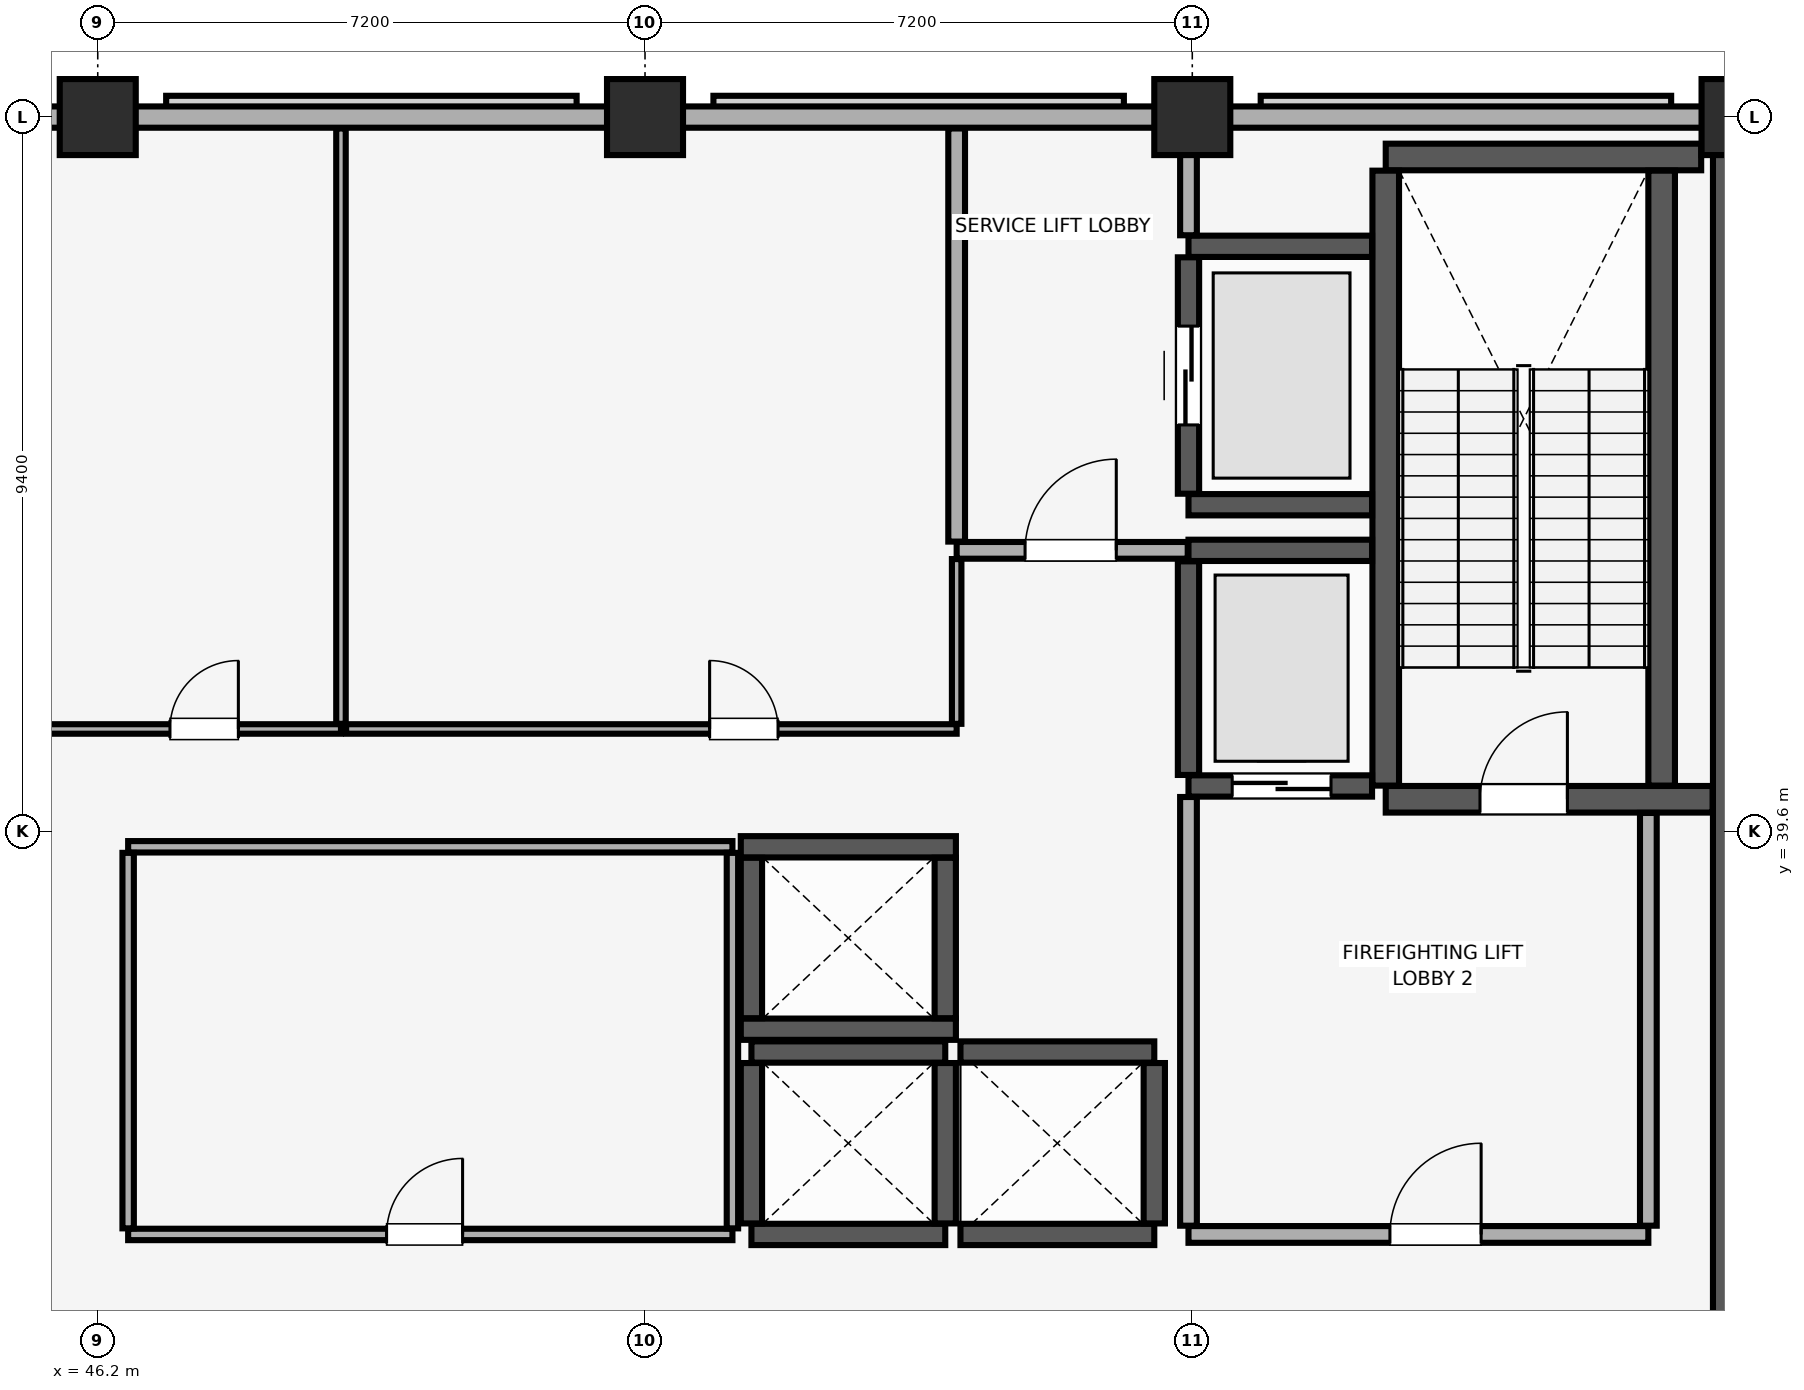
"""IFC4 building model, lengths in metres.
Left out: names, types, materials, properties, quantities, classifications, styles, units other than length and angle.
Written with IfcOpenShell. Run it as: python <this file> out.ifc"""

import sys

from ifc_helpers import new_model, si_unit, direction, frame, frame_2d, origin, origin_2d, place, context, subcontext, project, spatial, rectangle, extrude, element, fill, save


model = new_model("IFC4")
c1 = context("Model", 3, precision=1e-05, world=origin(), true_north=direction((0.0, 1.0)))
c2 = subcontext(c1, "Body", "Model", "MODEL_VIEW")
j1 = project(units=[si_unit("LENGTHUNIT", "METRE"), si_unit("PLANEANGLEUNIT", "RADIAN")], contexts=[c1])
p1 = place(None, origin())
s1 = spatial("IfcSite", under=j1, at=p1, CompositionType="ELEMENT")
p2 = place(p1, origin())
s2 = spatial("IfcBuilding", under=s1, at=p2, CompositionType="ELEMENT")
p3 = place(p2, frame((0.0, 0.0, 280.5)))
s3 = spatial("IfcBuildingStorey", under=s2, at=p3, CompositionType="ELEMENT", Elevation=280.5)
for number, where, z_axis, x_axis in (
    (1, (46.2, 49.0, 0.0), (0.0, 0.0, 1.0), (1.0, 0.0, 0.0)),
    (2, (53.4, 49.0, 0.0), (0.0, 0.0, 1.0), (1.0, 0.0, 0.0)),
    (3, (60.6, 49.0, 0.0), (0.0, 0.0, 1.0), (1.0, 0.0, 0.0)),
    (4, (67.8, 49.0, 0.0), (0.0, 0.0, 1.0), (1.0, 0.0, 0.0)),
):
    element("IfcColumn", number, at=place(p3, frame(where, z_axis=z_axis, x_axis=x_axis)), inside=s3, PredefinedType="COLUMN", context=c2, shape_type="SweptSolid", body=[
        extrude(rectangle(XDim=1.0, YDim=1.0, at=origin_2d()), origin(), (0.0, 0.0, 1.0), 5.1),
    ])
p4 = place(p3, frame((74.2, 49.0, 0.0), z_axis=(0.0, 0.0, 1.0), x_axis=(-1.0, 0.0, 0.0)))
e5 = element("IfcWall", 5, at=p4, inside=s3, PredefinedType="SOLIDWALL", context=c2, shape_type="SweptSolid", body=[
    extrude(rectangle(XDim=64.4, YDim=0.28, at=frame_2d((32.2, 0.0))), origin(), (0.0, 0.0, 1.0), 4.0),
])
p5 = place(p3, frame((67.8, 29.4, 0.0), z_axis=(0.0, 0.0, 1.0), x_axis=(0.0, 1.0, 0.0)))
e6 = element("IfcWall", 6, at=p5, inside=s3, PredefinedType="SHEAR", context=c2, shape_type="SweptSolid", body=[
    extrude(rectangle(XDim=19.2, YDim=0.7, at=frame_2d((9.6, 0.0))), origin(), (0.0, 0.0, 1.0), 5.1),
])
p6 = place(p3, frame((63.145, 40.025, 0.0), z_axis=(0.0, 0.0, 1.0), x_axis=(1.0, 0.0, 0.0)))
e7 = element("IfcWall", 7, at=p6, inside=s3, PredefinedType="SHEAR", context=c2, shape_type="SweptSolid", body=[
    extrude(rectangle(XDim=4.3, YDim=0.35, at=frame_2d((2.15, 0.0))), origin(), (0.0, 0.0, 1.0), 5.1),
])
p7 = place(p6, frame((1.24, 0.0, 0.0)))
e8 = element("IfcOpeningElement", 8, at=p7, cuts=e7, PredefinedType="OPENING", context=c2, shape_type="SweptSolid", body=[
    extrude(rectangle(XDim=1.15, YDim=2.15, at=frame_2d((0.575, 1.075))), frame((0.0, 0.185, 0.0), z_axis=(0.0, -1.0, 0.0), x_axis=(1.0, 0.0, 0.0)), (0.0, 0.0, 1.0), 0.37),
])
p8 = place(p3, frame((63.145, 48.475, 0.0), z_axis=(0.0, 0.0, 1.0), x_axis=(1.0, 0.0, 0.0)))
e9 = element("IfcWall", 9, at=p8, inside=s3, PredefinedType="SHEAR", context=c2, shape_type="SweptSolid", body=[
    extrude(rectangle(XDim=4.15, YDim=0.35, at=frame_2d((2.075, 0.0))), origin(), (0.0, 0.0, 1.0), 5.1),
])
for number, where, z_axis, x_axis in (
    (10, (63.145, 40.205, 0.0), (0.0, 0.0, 1.0), (0.0, 1.0, 0.0)),
    (11, (66.775, 40.205, 0.0), (0.0, 0.0, 1.0), (0.0, 1.0, 0.0)),
):
    element("IfcWall", number, at=place(p3, frame(where, z_axis=z_axis, x_axis=x_axis)), inside=s3, PredefinedType="SHEAR", context=c2, shape_type="SweptSolid", body=[
        extrude(rectangle(XDim=8.09, YDim=0.35, at=frame_2d((4.045, 0.0))), origin(), (0.0, 0.0, 1.0), 5.1),
    ])
for number, where, z_axis, x_axis in (
    (12, (54.8, 34.3, 0.0), (0.0, 0.0, 1.0), (1.0, 0.0, 0.0)),
    (13, (54.8, 36.7, 0.0), (0.0, 0.0, 1.0), (1.0, 0.0, 0.0)),
):
    element("IfcWall", number, at=place(p3, frame(where, z_axis=z_axis, x_axis=x_axis)), inside=s3, PredefinedType="SHEAR", context=c2, shape_type="SweptSolid", body=[
        extrude(rectangle(XDim=2.55, YDim=0.28, at=frame_2d((1.275, 0.0))), origin(), (0.0, 0.0, 1.0), 5.1),
    ])
for number, where, z_axis, x_axis in (
    (14, (54.8, 34.445, 0.0), (0.0, 0.0, 1.0), (0.0, 1.0, 0.0)),
    (15, (57.35, 34.445, 0.0), (0.0, 0.0, 1.0), (0.0, 1.0, 0.0)),
):
    element("IfcWall", number, at=place(p3, frame(where, z_axis=z_axis, x_axis=x_axis)), inside=s3, PredefinedType="SHEAR", context=c2, shape_type="SweptSolid", body=[
        extrude(rectangle(XDim=2.11, YDim=0.28, at=frame_2d((1.055, 0.0))), origin(), (0.0, 0.0, 1.0), 5.1),
    ])
for number, where, z_axis, x_axis in (
    (16, (57.55, 34.3, 0.0), (0.0, 0.0, 1.0), (1.0, 0.0, 0.0)),
    (17, (57.55, 36.7, 0.0), (0.0, 0.0, 1.0), (1.0, 0.0, 0.0)),
):
    element("IfcWall", number, at=place(p3, frame(where, z_axis=z_axis, x_axis=x_axis)), inside=s3, PredefinedType="SHEAR", context=c2, shape_type="SweptSolid", body=[
        extrude(rectangle(XDim=2.55, YDim=0.28, at=frame_2d((1.275, 0.0))), origin(), (0.0, 0.0, 1.0), 5.1),
    ])
p9 = place(p3, frame((60.1, 34.445, 0.0), z_axis=(0.0, 0.0, 1.0), x_axis=(0.0, 1.0, 0.0)))
e18 = element("IfcWall", 18, at=p9, inside=s3, PredefinedType="SHEAR", context=c2, shape_type="SweptSolid", body=[
    extrude(rectangle(XDim=2.11, YDim=0.28, at=frame_2d((1.055, 0.0))), origin(), (0.0, 0.0, 1.0), 5.1),
])
for number, where, z_axis, x_axis in (
    (19, (54.66, 37.0, 0.0), (0.0, 0.0, 1.0), (1.0, 0.0, 0.0)),
    (20, (54.66, 39.4, 0.0), (0.0, 0.0, 1.0), (1.0, 0.0, 0.0)),
):
    element("IfcWall", number, at=place(p3, frame(where, z_axis=z_axis, x_axis=x_axis)), inside=s3, PredefinedType="SHEAR", context=c2, shape_type="SweptSolid", body=[
        extrude(rectangle(XDim=2.83, YDim=0.28, at=frame_2d((1.415, 0.0))), origin(), (0.0, 0.0, 1.0), 5.1),
    ])
for number, where, z_axis, x_axis in (
    (21, (54.8, 37.145, 0.0), (0.0, 0.0, 1.0), (0.0, 1.0, 0.0)),
    (22, (57.35, 37.145, 0.0), (0.0, 0.0, 1.0), (0.0, 1.0, 0.0)),
):
    element("IfcWall", number, at=place(p3, frame(where, z_axis=z_axis, x_axis=x_axis)), inside=s3, PredefinedType="SHEAR", context=c2, shape_type="SweptSolid", body=[
        extrude(rectangle(XDim=2.11, YDim=0.28, at=frame_2d((1.055, 0.0))), origin(), (0.0, 0.0, 1.0), 5.1),
    ])
p10 = place(p3, frame((60.55, 40.2, 0.0), z_axis=(0.0, 0.0, 1.0), x_axis=(1.0, 0.0, 0.0)))
e23 = element("IfcWall", 23, at=p10, inside=s3, PredefinedType="SHEAR", context=c2, shape_type="SweptSolid", body=[
    extrude(rectangle(XDim=2.415, YDim=0.28, at=frame_2d((1.208, 0.0))), origin(), (0.0, 0.0, 1.0), 5.1),
])
p11 = place(p10, frame((0.575, 0.0, 0.0)))
e24 = element("IfcOpeningElement", 24, at=p11, cuts=e23, PredefinedType="OPENING", context=c2, shape_type="SweptSolid", body=[
    extrude(rectangle(XDim=1.3, YDim=2.3, at=frame_2d((0.65, 1.15))), frame((0.0, 0.15, 0.0), z_axis=(0.0, -1.0, 0.0), x_axis=(1.0, 0.0, 0.0)), (0.0, 0.0, 1.0), 0.3),
])
p12 = place(p3, frame((60.55, 43.3, 0.0), z_axis=(0.0, 0.0, 1.0), x_axis=(1.0, 0.0, 0.0)))
e25 = element("IfcWall", 25, at=p12, inside=s3, PredefinedType="SHEAR", context=c2, shape_type="SweptSolid", body=[
    extrude(rectangle(XDim=2.415, YDim=0.28, at=frame_2d((1.208, 0.0))), origin(), (0.0, 0.0, 1.0), 5.1),
])
p13 = place(p3, frame((60.55, 40.345, 0.0), z_axis=(0.0, 0.0, 1.0), x_axis=(0.0, 1.0, 0.0)))
e26 = element("IfcWall", 26, at=p13, inside=s3, PredefinedType="SHEAR", context=c2, shape_type="SweptSolid", body=[
    extrude(rectangle(XDim=2.81, YDim=0.28, at=frame_2d((1.405, 0.0))), origin(), (0.0, 0.0, 1.0), 5.1),
])
for number, where, z_axis, x_axis in (
    (27, (60.55, 43.9, 0.0), (0.0, 0.0, 1.0), (1.0, 0.0, 0.0)),
    (28, (60.55, 47.3, 0.0), (0.0, 0.0, 1.0), (1.0, 0.0, 0.0)),
):
    element("IfcWall", number, at=place(p3, frame(where, z_axis=z_axis, x_axis=x_axis)), inside=s3, PredefinedType="SHEAR", context=c2, shape_type="SweptSolid", body=[
        extrude(rectangle(XDim=2.415, YDim=0.28, at=frame_2d((1.208, 0.0))), origin(), (0.0, 0.0, 1.0), 5.1),
    ])
p14 = place(p3, frame((60.55, 44.045, 0.0), z_axis=(0.0, 0.0, 1.0), x_axis=(0.0, 1.0, 0.0)))
e29 = element("IfcWall", 29, at=p14, inside=s3, PredefinedType="SHEAR", context=c2, shape_type="SweptSolid", body=[
    extrude(rectangle(XDim=3.11, YDim=0.28, at=frame_2d((1.555, 0.0))), origin(), (0.0, 0.0, 1.0), 5.1),
])
p15 = place(p14, frame((0.905, 0.0, 0.0)))
e30 = element("IfcOpeningElement", 30, at=p15, cuts=e29, PredefinedType="OPENING", context=c2, shape_type="SweptSolid", body=[
    extrude(rectangle(XDim=1.3, YDim=2.3, at=frame_2d((0.65, 1.15))), frame((0.0, 0.15, 0.0), z_axis=(0.0, -1.0, 0.0), x_axis=(1.0, 0.0, 0.0)), (0.0, 0.0, 1.0), 0.3),
])
p16 = place(p3, frame((60.55, 34.3, 0.0), z_axis=(0.0, 0.0, 1.0), x_axis=(1.0, 0.0, 0.0)))
e31 = element("IfcWall", 31, at=p16, inside=s3, PredefinedType="PARTITIONING", context=c2, shape_type="SweptSolid", body=[
    extrude(rectangle(XDim=6.05, YDim=0.22, at=frame_2d((3.025, 0.0))), origin(), (0.0, 0.0, 1.0), 5.1),
])
p17 = place(p16, frame((2.65, 0.0, 0.0)))
e32 = element("IfcOpeningElement", 32, at=p17, cuts=e31, PredefinedType="OPENING", context=c2, shape_type="SweptSolid", body=[
    extrude(rectangle(XDim=1.2, YDim=2.15, at=frame_2d((0.6, 1.075))), frame((0.0, 0.12, 0.0), z_axis=(0.0, -1.0, 0.0), x_axis=(1.0, 0.0, 0.0)), (0.0, 0.0, 1.0), 0.24),
])
p18 = place(p3, frame((60.55, 34.415, 0.0), z_axis=(0.0, 0.0, 1.0), x_axis=(0.0, 1.0, 0.0)))
e33 = element("IfcWall", 33, at=p18, inside=s3, PredefinedType="PARTITIONING", context=c2, shape_type="SweptSolid", body=[
    extrude(rectangle(XDim=5.64, YDim=0.22, at=frame_2d((2.82, 0.0))), origin(), (0.0, 0.0, 1.0), 5.1),
])
p19 = place(p3, frame((66.6, 34.415, 0.0), z_axis=(0.0, 0.0, 1.0), x_axis=(0.0, 1.0, 0.0)))
e34 = element("IfcWall", 34, at=p19, inside=s3, PredefinedType="PARTITIONING", context=c2, shape_type="SweptSolid", body=[
    extrude(rectangle(XDim=5.43, YDim=0.22, at=frame_2d((2.715, 0.0))), origin(), (0.0, 0.0, 1.0), 5.1),
])
p20 = place(p3, frame((57.5, 43.3, 0.0), z_axis=(0.0, 0.0, 1.0), x_axis=(1.0, 0.0, 0.0)))
e35 = element("IfcWall", 35, at=p20, inside=s3, PredefinedType="PARTITIONING", context=c2, shape_type="SweptSolid", body=[
    extrude(rectangle(XDim=3.04, YDim=0.22, at=frame_2d((1.52, 0.0))), origin(), (0.0, 0.0, 1.0), 5.1),
])
p21 = place(p20, frame((0.9, 0.0, 0.0)))
e36 = element("IfcOpeningElement", 36, at=p21, cuts=e35, PredefinedType="OPENING", context=c2, shape_type="SweptSolid", body=[
    extrude(rectangle(XDim=1.2, YDim=2.15, at=frame_2d((0.6, 1.075))), frame((0.0, 0.12, 0.0), z_axis=(0.0, -1.0, 0.0), x_axis=(1.0, 0.0, 0.0)), (0.0, 0.0, 1.0), 0.24),
])
p22 = place(p3, frame((57.5, 43.415, 0.0), z_axis=(0.0, 0.0, 1.0), x_axis=(0.0, 1.0, 0.0)))
e37 = element("IfcWall", 37, at=p22, inside=s3, PredefinedType="PARTITIONING", context=c2, shape_type="SweptSolid", body=[
    extrude(rectangle(XDim=5.435, YDim=0.22, at=frame_2d((2.718, 0.0))), origin(), (0.0, 0.0, 1.0), 5.1),
])
p23 = place(p3, frame((60.55, 47.445, 0.0), z_axis=(0.0, 0.0, 1.0), x_axis=(0.0, 1.0, 0.0)))
e38 = element("IfcWall", 38, at=p23, inside=s3, PredefinedType="PARTITIONING", context=c2, shape_type="SweptSolid", body=[
    extrude(rectangle(XDim=1.405, YDim=0.22, at=frame_2d((0.703, 0.0))), origin(), (0.0, 0.0, 1.0), 5.1),
])
p24 = place(p3, frame((46.6, 34.3, 0.0), z_axis=(0.0, 0.0, 1.0), x_axis=(1.0, 0.0, 0.0)))
e39 = element("IfcWall", 39, at=p24, inside=s3, PredefinedType="PARTITIONING", context=c2, shape_type="SweptSolid", body=[
    extrude(rectangle(XDim=7.95, YDim=0.15, at=frame_2d((3.975, 0.0))), origin(), (0.0, 0.0, 1.0), 5.1),
])
p25 = place(p24, frame((3.4, 0.0, 0.0)))
e40 = element("IfcOpeningElement", 40, at=p25, cuts=e39, PredefinedType="OPENING", context=c2, shape_type="SweptSolid", body=[
    extrude(rectangle(XDim=1.0, YDim=2.15, at=frame_2d((0.5, 1.075))), frame((0.0, 0.085, 0.0), z_axis=(0.0, -1.0, 0.0), x_axis=(1.0, 0.0, 0.0)), (0.0, 0.0, 1.0), 0.17),
])
p26 = place(p3, frame((46.6, 39.4, 0.0), z_axis=(0.0, 0.0, 1.0), x_axis=(1.0, 0.0, 0.0)))
e41 = element("IfcWall", 41, at=p26, inside=s3, PredefinedType="PARTITIONING", context=c2, shape_type="SweptSolid", body=[
    extrude(rectangle(XDim=7.95, YDim=0.15, at=frame_2d((3.975, 0.0))), origin(), (0.0, 0.0, 1.0), 5.1),
])
for number, where, z_axis, x_axis in (
    (42, (46.6, 34.38, 0.0), (0.0, 0.0, 1.0), (0.0, 1.0, 0.0)),
    (43, (54.55, 34.38, 0.0), (0.0, 0.0, 1.0), (0.0, 1.0, 0.0)),
):
    element("IfcWall", number, at=place(p3, frame(where, z_axis=z_axis, x_axis=x_axis)), inside=s3, PredefinedType="PARTITIONING", context=c2, shape_type="SweptSolid", body=[
        extrude(rectangle(XDim=4.94, YDim=0.15, at=frame_2d((2.47, 0.0))), origin(), (0.0, 0.0, 1.0), 5.1),
    ])
p27 = place(p3, frame((44.3, 40.95, 0.0), z_axis=(0.0, 0.0, 1.0), x_axis=(1.0, 0.0, 0.0)))
e44 = element("IfcWall", 44, at=p27, inside=s3, PredefinedType="PARTITIONING", context=c2, shape_type="SweptSolid", body=[
    extrude(rectangle(XDim=5.1, YDim=0.125, at=frame_2d((2.55, 0.0))), origin(), (0.0, 0.0, 1.0), 5.1),
])
p28 = place(p27, frame((2.85, 0.0, 0.0)))
e45 = element("IfcOpeningElement", 45, at=p28, cuts=e44, PredefinedType="OPENING", context=c2, shape_type="SweptSolid", body=[
    extrude(rectangle(XDim=0.9, YDim=2.1, at=frame_2d((0.45, 1.05))), frame((0.0, 0.073, 0.0), z_axis=(0.0, -1.0, 0.0), x_axis=(1.0, 0.0, 0.0)), (0.0, 0.0, 1.0), 0.145),
])
p29 = place(p3, frame((49.4, 41.018, 0.0), z_axis=(0.0, 0.0, 1.0), x_axis=(0.0, 1.0, 0.0)))
e46 = element("IfcWall", 46, at=p29, inside=s3, PredefinedType="PARTITIONING", context=c2, shape_type="SweptSolid", body=[
    extrude(rectangle(XDim=7.833, YDim=0.125, at=frame_2d((3.916, 0.0))), origin(), (0.0, 0.0, 1.0), 5.1),
])
p30 = place(p3, frame((49.468, 40.95, 0.0), z_axis=(0.0, 0.0, 1.0), x_axis=(1.0, 0.0, 0.0)))
e47 = element("IfcWall", 47, at=p30, inside=s3, PredefinedType="PARTITIONING", context=c2, shape_type="SweptSolid", body=[
    extrude(rectangle(XDim=8.032, YDim=0.125, at=frame_2d((4.016, 0.0))), origin(), (0.0, 0.0, 1.0), 5.1),
])
p31 = place(p30, frame((4.782, 0.0, 0.0)))
e48 = element("IfcOpeningElement", 48, at=p31, cuts=e47, PredefinedType="OPENING", context=c2, shape_type="SweptSolid", body=[
    extrude(rectangle(XDim=0.9, YDim=2.1, at=frame_2d((0.45, 1.05))), frame((0.0, 0.073, 0.0), z_axis=(0.0, -1.0, 0.0), x_axis=(1.0, 0.0, 0.0)), (0.0, 0.0, 1.0), 0.145),
])
p32 = place(p3, frame((57.5, 41.018, 0.0), z_axis=(0.0, 0.0, 1.0), x_axis=(0.0, 1.0, 0.0)))
e49 = element("IfcWall", 49, at=p32, inside=s3, PredefinedType="PARTITIONING", context=c2, shape_type="SweptSolid", body=[
    extrude(rectangle(XDim=2.167, YDim=0.125, at=frame_2d((1.084, 0.0))), origin(), (0.0, 0.0, 1.0), 5.1),
])
p33 = place(p7, origin())
e50 = element("IfcDoor", 50, at=p33, inside=s3, OperationType="SINGLE_SWING_RIGHT", PredefinedType="DOOR", context=c2, shape_type="SweptSolid", body=[
    extrude(rectangle(XDim=1.15, YDim=2.15, at=frame_2d((0.575, 1.075))), frame((0.0, 0.025, 0.0), z_axis=(0.0, -1.0, 0.0), x_axis=(1.0, 0.0, 0.0)), (0.0, 0.0, 1.0), 0.05),
])
fill(e8, e50)
p34 = place(p11, origin())
e51 = element("IfcDoor", 51, at=p34, inside=s3, OperationType="DOUBLE_DOOR_SLIDING", PredefinedType="DOOR", context=c2, shape_type="SweptSolid", body=[
    extrude(rectangle(XDim=1.3, YDim=2.3, at=frame_2d((0.65, 1.15))), frame((0.0, 0.025, 0.0), z_axis=(0.0, -1.0, 0.0), x_axis=(1.0, 0.0, 0.0)), (0.0, 0.0, 1.0), 0.05),
])
fill(e24, e51)
p35 = place(p15, origin())
e52 = element("IfcDoor", 52, at=p35, inside=s3, OperationType="DOUBLE_DOOR_SLIDING", PredefinedType="DOOR", context=c2, shape_type="SweptSolid", body=[
    extrude(rectangle(XDim=1.3, YDim=2.3, at=frame_2d((0.65, 1.15))), frame((0.0, 0.025, 0.0), z_axis=(0.0, -1.0, 0.0), x_axis=(1.0, 0.0, 0.0)), (0.0, 0.0, 1.0), 0.05),
])
fill(e30, e52)
p36 = place(p17, origin())
e53 = element("IfcDoor", 53, at=p36, inside=s3, OperationType="SINGLE_SWING_RIGHT", PredefinedType="DOOR", context=c2, shape_type="SweptSolid", body=[
    extrude(rectangle(XDim=1.2, YDim=2.15, at=frame_2d((0.6, 1.075))), frame((0.0, 0.025, 0.0), z_axis=(0.0, -1.0, 0.0), x_axis=(1.0, 0.0, 0.0)), (0.0, 0.0, 1.0), 0.05),
])
fill(e32, e53)
p37 = place(p21, origin())
e54 = element("IfcDoor", 54, at=p37, inside=s3, OperationType="SINGLE_SWING_RIGHT", PredefinedType="DOOR", context=c2, shape_type="SweptSolid", body=[
    extrude(rectangle(XDim=1.2, YDim=2.15, at=frame_2d((0.6, 1.075))), frame((0.0, 0.025, 0.0), z_axis=(0.0, -1.0, 0.0), x_axis=(1.0, 0.0, 0.0)), (0.0, 0.0, 1.0), 0.05),
])
fill(e36, e54)
p38 = place(p25, origin())
e55 = element("IfcDoor", 55, at=p38, inside=s3, OperationType="SINGLE_SWING_RIGHT", PredefinedType="DOOR", context=c2, shape_type="SweptSolid", body=[
    extrude(rectangle(XDim=1.0, YDim=2.15, at=frame_2d((0.5, 1.075))), frame((0.0, 0.025, 0.0), z_axis=(0.0, -1.0, 0.0), x_axis=(1.0, 0.0, 0.0)), (0.0, 0.0, 1.0), 0.05),
])
fill(e40, e55)
p39 = place(p28, origin())
e56 = element("IfcDoor", 56, at=p39, inside=s3, OperationType="SINGLE_SWING_RIGHT", PredefinedType="DOOR", context=c2, shape_type="SweptSolid", body=[
    extrude(rectangle(XDim=0.9, YDim=2.1, at=frame_2d((0.45, 1.05))), frame((0.0, 0.025, 0.0), z_axis=(0.0, -1.0, 0.0), x_axis=(1.0, 0.0, 0.0)), (0.0, 0.0, 1.0), 0.05),
])
fill(e45, e56)
p40 = place(p31, origin())
e57 = element("IfcDoor", 57, at=p40, inside=s3, OperationType="SINGLE_SWING_LEFT", PredefinedType="DOOR", context=c2, shape_type="SweptSolid", body=[
    extrude(rectangle(XDim=0.9, YDim=2.1, at=frame_2d((0.45, 1.05))), frame((0.0, 0.025, 0.0), z_axis=(0.0, -1.0, 0.0), x_axis=(1.0, 0.0, 0.0)), (0.0, 0.0, 1.0), 0.05),
])
fill(e48, e57)
save(model, sys.argv[1])
